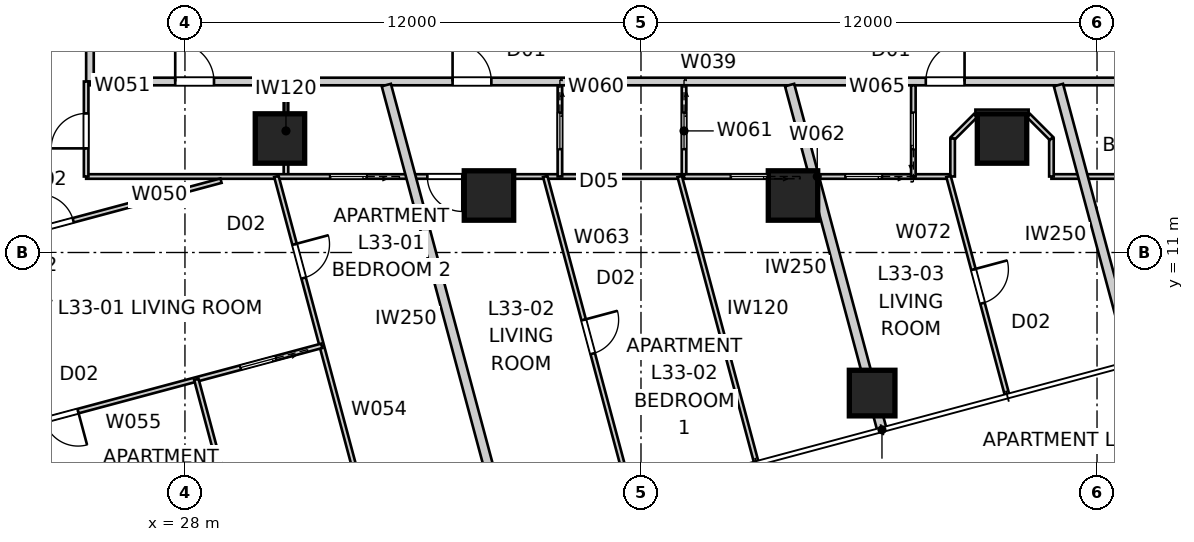
"""IFC4 building model, lengths in metres.
Left out: names, types, materials, properties, quantities, classifications, styles, units other than length and angle.
Written with IfcOpenShell. Run it as: python <this file> out.ifc"""

import sys

from ifc_helpers import new_model, si_unit, direction, frame, frame_2d, origin, origin_2d, place, context, subcontext, project, spatial, rectangle, extrude, element, fill, save


model = new_model("IFC4")
c1 = context("Model", 3, precision=1e-05, world=origin(), true_north=direction((0.0, 1.0)))
c2 = subcontext(c1, "Body", "Model", "MODEL_VIEW")
j1 = project(units=[si_unit("LENGTHUNIT", "METRE"), si_unit("PLANEANGLEUNIT", "RADIAN")], contexts=[c1])
p1 = place(None, origin())
s1 = spatial("IfcSite", under=j1, at=p1, CompositionType="ELEMENT")
p2 = place(p1, origin())
s2 = spatial("IfcBuilding", under=s1, at=p2, CompositionType="ELEMENT")
p3 = place(p2, frame((0.0, 0.0, 121.8)))
s3 = spatial("IfcBuildingStorey", under=s2, at=p3, CompositionType="ELEMENT", Elevation=121.8)
p4 = place(p3, frame((46.082, 7.301, 0.0), z_axis=(0.0, 0.0, 1.0), x_axis=(1.0, 0.0, 0.0)))
e1 = element("IfcColumn", 1, at=p4, inside=s3, PredefinedType="COLUMN", context=c2, shape_type="SweptSolid", body=[
    extrude(rectangle(XDim=1.2, YDim=1.2, at=origin_2d()), origin(), (0.0, 0.0, 1.0), 3.4),
])
for number, where, z_axis, x_axis in (
    (2, (30.5, 14.0, 0.0), (0.0, 0.0, 1.0), (1.0, 0.0, 0.0)),
    (3, (36.0, 12.5, 0.0), (0.0, 0.0, 1.0), (1.0, 0.0, 0.0)),
    (4, (44.0, 12.5, 0.0), (0.0, 0.0, 1.0), (1.0, 0.0, 0.0)),
    (5, (49.5, 14.0, 0.0), (0.0, 0.0, 1.0), (1.0, 0.0, 0.0)),
):
    element("IfcColumn", number, at=place(p3, frame(where, z_axis=z_axis, x_axis=x_axis)), inside=s3, PredefinedType="COLUMN", context=c2, shape_type="SweptSolid", body=[
        extrude(rectangle(XDim=1.3, YDim=1.3, at=origin_2d()), origin(), (0.0, 0.0, 1.0), 3.4),
    ])
p5 = place(p3, frame((25.5, 15.5, 0.0), z_axis=(0.0, 0.0, 1.0), x_axis=(1.0, 0.0, 0.0)))
e6 = element("IfcWall", 6, at=p5, inside=s3, PredefinedType="PARTITIONING", context=c2, shape_type="SweptSolid", body=[
    extrude(rectangle(XDim=28.2, YDim=0.2, at=frame_2d((14.1, 0.0))), origin(), (0.0, 0.0, 1.0), 3.25),
])
p6 = place(p5, frame((2.244, 0.0, 0.0)))
e7 = element("IfcOpeningElement", 7, at=p6, cuts=e6, PredefinedType="OPENING", context=c2, shape_type="SweptSolid", body=[
    extrude(rectangle(XDim=1.02, YDim=2.1, at=frame_2d((0.51, 1.05))), frame((0.0, 0.11, 0.0), z_axis=(0.0, -1.0, 0.0), x_axis=(1.0, 0.0, 0.0)), (0.0, 0.0, 1.0), 0.22),
])
p7 = place(p5, frame((9.542, 0.0, 0.0)))
e8 = element("IfcOpeningElement", 8, at=p7, cuts=e6, PredefinedType="OPENING", context=c2, shape_type="SweptSolid", body=[
    extrude(rectangle(XDim=1.02, YDim=2.34, at=frame_2d((0.51, 1.17))), frame((0.0, 0.11, 0.0), z_axis=(0.0, -1.0, 0.0), x_axis=(1.0, 0.0, 0.0)), (0.0, 0.0, 1.0), 0.22),
])
p8 = place(p5, frame((21.994, 0.0, 0.0)))
e9 = element("IfcOpeningElement", 9, at=p8, cuts=e6, PredefinedType="OPENING", context=c2, shape_type="SweptSolid", body=[
    extrude(rectangle(XDim=1.02, YDim=2.34, at=frame_2d((0.51, 1.17))), frame((0.0, 0.11, 0.0), z_axis=(0.0, -1.0, 0.0), x_axis=(1.0, 0.0, 0.0)), (0.0, 0.0, 1.0), 0.22),
])
p9 = place(p3, frame((25.5, 43.7, 0.0), z_axis=(0.0, 0.0, 1.0), x_axis=(0.0, -1.0, 0.0)))
e10 = element("IfcWall", 10, at=p9, inside=s3, PredefinedType="PARTITIONING", context=c2, shape_type="SweptSolid", body=[
    extrude(rectangle(XDim=28.2, YDim=0.2, at=frame_2d((14.1, 0.0))), origin(), (0.0, 0.0, 1.0), 3.25),
])
p10 = place(p9, frame((8.742, 0.0, 0.0)))
e11 = element("IfcOpeningElement", 11, at=p10, cuts=e10, PredefinedType="OPENING", context=c2, shape_type="SweptSolid", body=[
    extrude(rectangle(XDim=1.02, YDim=2.34, at=frame_2d((0.51, 1.17))), frame((0.0, 0.11, 0.0), z_axis=(0.0, -1.0, 0.0), x_axis=(1.0, 0.0, 0.0)), (0.0, 0.0, 1.0), 0.22),
])
p11 = place(p9, frame((1.808, 0.0, 0.0)))
e12 = element("IfcOpeningElement", 12, at=p11, cuts=e10, PredefinedType="OPENING", context=c2, shape_type="SweptSolid", body=[
    extrude(rectangle(XDim=1.02, YDim=2.1, at=frame_2d((0.51, 1.05))), frame((0.0, 0.11, 0.0), z_axis=(0.0, -1.0, 0.0), x_axis=(1.0, 0.0, 0.0)), (0.0, 0.0, 1.0), 0.22),
])
p12 = place(p3, frame((36.44, 3.682, 0.0), z_axis=(0.0, 0.0, 1.0), x_axis=(-0.258824223352, 0.965924438766, 0.0)))
e13 = element("IfcWall", 13, at=p12, inside=s3, PredefinedType="PARTITIONING", context=c2, shape_type="SweptSolid", body=[
    extrude(rectangle(XDim=12.138, YDim=0.25, at=frame_2d((6.069, 0.0))), origin(), (0.0, 0.0, 1.0), 3.25),
])
p13 = place(p3, frame((46.341, 6.335, 0.0), z_axis=(0.0, 0.0, 1.0), x_axis=(-0.258814481793, 0.965927049013, 0.0)))
e14 = element("IfcWall", 14, at=p13, inside=s3, PredefinedType="PARTITIONING", context=c2, shape_type="SweptSolid", body=[
    extrude(rectangle(XDim=9.392, YDim=0.25, at=frame_2d((4.696, 0.0))), origin(), (0.0, 0.0, 1.0), 3.25),
])
p14 = place(p3, frame((52.942, 8.104, 0.0), z_axis=(0.0, 0.0, 1.0), x_axis=(-0.258822171171, 0.965924988656, 0.0)))
e15 = element("IfcWall", 15, at=p14, inside=s3, PredefinedType="PARTITIONING", context=c2, shape_type="SweptSolid", body=[
    extrude(rectangle(XDim=7.56, YDim=0.25, at=frame_2d((3.78, 0.0))), origin(), (0.0, 0.0, 1.0), 3.25),
])
p15 = place(p3, frame((30.658, 15.4, 0.0), z_axis=(0.0, 0.0, 1.0), x_axis=(0.0, -1.0, 0.0)))
e16 = element("IfcWall", 16, at=p15, inside=s3, PredefinedType="PARTITIONING", context=c2, shape_type="SweptSolid", body=[
    extrude(rectangle(XDim=2.4, YDim=0.12, at=frame_2d((1.2, 0.0))), origin(), (0.0, 0.0, 1.0), 3.25),
])
p16 = place(p3, frame((41.07, 13.0, 0.0), z_axis=(0.0, 0.0, 1.0), x_axis=(-1.0, 0.0, 0.0)))
e17 = element("IfcWall", 17, at=p16, inside=s3, PredefinedType="PARTITIONING", context=c2, shape_type="SweptSolid", body=[
    extrude(rectangle(XDim=15.67, YDim=0.12, at=frame_2d((7.835, 0.0))), origin(), (0.0, 0.0, 1.0), 2.55),
])
p17 = place(p16, frame((5.772, 0.0, 0.0)))
e18 = element("IfcOpeningElement", 18, at=p17, cuts=e17, PredefinedType="OPENING", context=c2, shape_type="SweptSolid", body=[
    extrude(rectangle(XDim=0.92, YDim=2.34, at=frame_2d((0.46, 1.17))), frame((0.0, 0.07, 0.0), z_axis=(0.0, -1.0, 0.0), x_axis=(1.0, 0.0, 0.0)), (0.0, 0.0, 1.0), 0.14),
])
p18 = place(p16, frame((8.289, 0.0, 0.0)))
e19 = element("IfcOpeningElement", 19, at=p18, cuts=e17, PredefinedType="OPENING", context=c2, shape_type="SweptSolid", body=[
    extrude(rectangle(XDim=0.96, YDim=2.1, at=frame_2d((0.48, 1.05))), frame((0.0, 0.07, 0.0), z_axis=(0.0, -1.0, 0.0), x_axis=(1.0, 0.0, 0.0)), (0.0, 0.0, 1.0), 0.14),
])
p19 = place(p3, frame((25.4, 13.0, 0.0), z_axis=(0.0, 0.0, 1.0), x_axis=(0.0, 1.0, 0.0)))
e20 = element("IfcWall", 20, at=p19, inside=s3, PredefinedType="PARTITIONING", context=c2, shape_type="SweptSolid", body=[
    extrude(rectangle(XDim=2.5, YDim=0.12, at=frame_2d((1.25, 0.0))), origin(), (0.0, 0.0, 1.0), 3.25),
])
p20 = place(p19, frame((0.74, 0.0, 0.0)))
e21 = element("IfcOpeningElement", 21, at=p20, cuts=e20, PredefinedType="OPENING", context=c2, shape_type="SweptSolid", body=[
    extrude(rectangle(XDim=0.92, YDim=2.34, at=frame_2d((0.46, 1.17))), frame((0.0, 0.07, 0.0), z_axis=(0.0, -1.0, 0.0), x_axis=(1.0, 0.0, 0.0)), (0.0, 0.0, 1.0), 0.14),
])
p21 = place(p3, frame((30.406, 13.0, 0.0), z_axis=(0.0, 0.0, 1.0), x_axis=(0.258819200315, -0.9659257847, 0.0)))
e22 = element("IfcWall", 22, at=p21, inside=s3, PredefinedType="PARTITIONING", context=c2, shape_type="SweptSolid", body=[
    extrude(rectangle(XDim=10.522, YDim=0.12, at=frame_2d((5.261, 0.0))), origin(), (0.0, 0.0, 1.0), 2.722),
])
p22 = place(p21, frame((1.846, 0.0, 0.0)))
e23 = element("IfcOpeningElement", 23, at=p22, cuts=e22, PredefinedType="OPENING", context=c2, shape_type="SweptSolid", body=[
    extrude(rectangle(XDim=0.92, YDim=2.34, at=frame_2d((0.46, 1.17))), frame((0.0, 0.07, 0.0), z_axis=(0.0, -1.0, 0.0), x_axis=(1.0, 0.0, 0.0)), (0.0, 0.0, 1.0), 0.14),
])
p23 = place(p3, frame((31.6, 8.544, 0.0), z_axis=(0.0, 0.0, 1.0), x_axis=(-0.965927151587, -0.258814098973, 0.0)))
e24 = element("IfcWall", 24, at=p23, inside=s3, PredefinedType="PARTITIONING", context=c2, shape_type="SweptSolid", body=[
    extrude(rectangle(XDim=10.793, YDim=0.12, at=frame_2d((5.396, 0.0))), origin(), (0.0, 0.0, 1.0), 3.25),
])
p24 = place(p23, frame((6.64, 0.0, 0.0)))
e25 = element("IfcOpeningElement", 25, at=p24, cuts=e24, PredefinedType="OPENING", context=c2, shape_type="SweptSolid", body=[
    extrude(rectangle(XDim=0.92, YDim=2.34, at=frame_2d((0.46, 1.17))), frame((0.0, 0.07, 0.0), z_axis=(0.0, -1.0, 0.0), x_axis=(1.0, 0.0, 0.0)), (0.0, 0.0, 1.0), 0.14),
])
p25 = place(p23, frame((1.253, 0.0, 0.0)))
e26 = element("IfcOpeningElement", 26, at=p25, cuts=e24, PredefinedType="OPENING", context=c2, shape_type="SweptSolid", body=[
    extrude(rectangle(XDim=0.96, YDim=2.1, at=frame_2d((0.48, 1.05))), frame((0.0, 0.07, 0.0), z_axis=(0.0, -1.0, 0.0), x_axis=(1.0, 0.0, 0.0)), (0.0, 0.0, 1.0), 0.14),
])
p26 = place(p3, frame((19.911, 10.468, 0.0), z_axis=(0.0, 0.0, 1.0), x_axis=(0.965927203676, 0.25881390457, 0.0)))
e27 = element("IfcWall", 27, at=p26, inside=s3, PredefinedType="PARTITIONING", context=c2, shape_type="SweptSolid", body=[
    extrude(rectangle(XDim=9.357, YDim=0.12, at=frame_2d((4.678, 0.0))), origin(), (0.0, 0.0, 1.0), 2.638),
])
p27 = place(p26, frame((4.411, 0.0, 0.0)))
e28 = element("IfcOpeningElement", 28, at=p27, cuts=e27, PredefinedType="OPENING", context=c2, shape_type="SweptSolid", body=[
    extrude(rectangle(XDim=0.92, YDim=2.34, at=frame_2d((0.46, 1.17))), frame((0.0, 0.07, 0.0), z_axis=(0.0, -1.0, 0.0), x_axis=(1.0, 0.0, 0.0)), (0.0, 0.0, 1.0), 0.14),
])
p28 = place(p3, frame((28.3, 7.66, 0.0), z_axis=(0.0, 0.0, 1.0), x_axis=(0.25882212607, -0.965925000741, 0.0)))
e29 = element("IfcWall", 29, at=p28, inside=s3, PredefinedType="PARTITIONING", context=c2, shape_type="SweptSolid", body=[
    extrude(rectangle(XDim=5.91, YDim=0.12, at=frame_2d((2.955, 0.0))), origin(), (0.0, 0.0, 1.0), 3.25),
])
p29 = place(p3, frame((37.866, 15.4, 0.0), z_axis=(0.0, 0.0, 1.0), x_axis=(0.0, -1.0, 0.0)))
e30 = element("IfcWall", 30, at=p29, inside=s3, PredefinedType="PARTITIONING", context=c2, shape_type="SweptSolid", body=[
    extrude(rectangle(XDim=2.4, YDim=0.12, at=frame_2d((1.2, 0.0))), origin(), (0.0, 0.0, 1.0), 3.25),
])
p30 = place(p29, frame((0.72, 0.0, 0.0)))
e31 = element("IfcOpeningElement", 31, at=p30, cuts=e30, PredefinedType="OPENING", context=c2, shape_type="SweptSolid", body=[
    extrude(rectangle(XDim=0.96, YDim=2.1, at=frame_2d((0.48, 1.05))), frame((0.0, 0.07, 0.0), z_axis=(0.0, -1.0, 0.0), x_axis=(1.0, 0.0, 0.0)), (0.0, 0.0, 1.0), 0.14),
])
p31 = place(p3, frame((41.132, 15.4, 0.0), z_axis=(0.0, 0.0, 1.0), x_axis=(0.0, -1.0, 0.0)))
e32 = element("IfcWall", 32, at=p31, inside=s3, PredefinedType="PARTITIONING", context=c2, shape_type="SweptSolid", body=[
    extrude(rectangle(XDim=2.4, YDim=0.12, at=frame_2d((1.2, 0.0))), origin(), (0.0, 0.0, 1.0), 3.25),
])
p32 = place(p31, frame((0.72, 0.0, 0.0)))
e33 = element("IfcOpeningElement", 33, at=p32, cuts=e32, PredefinedType="OPENING", context=c2, shape_type="SweptSolid", body=[
    extrude(rectangle(XDim=0.96, YDim=2.1, at=frame_2d((0.48, 1.05))), frame((0.0, 0.07, 0.0), z_axis=(0.0, -1.0, 0.0), x_axis=(1.0, 0.0, 0.0)), (0.0, 0.0, 1.0), 0.14),
])
p33 = place(p3, frame((48.144, 13.0, 0.0), z_axis=(0.0, 0.0, 1.0), x_axis=(-1.0, 0.0, 0.0)))
e34 = element("IfcWall", 34, at=p33, inside=s3, PredefinedType="PARTITIONING", context=c2, shape_type="SweptSolid", body=[
    extrude(rectangle(XDim=7.012, YDim=0.12, at=frame_2d((3.506, 0.0))), origin(), (0.0, 0.0, 1.0), 2.55),
])
p34 = place(p33, frame((1.803, 0.0, 0.0)))
e35 = element("IfcOpeningElement", 35, at=p34, cuts=e34, PredefinedType="OPENING", context=c2, shape_type="SweptSolid", body=[
    extrude(rectangle(XDim=0.96, YDim=2.1, at=frame_2d((0.48, 1.05))), frame((0.0, 0.07, 0.0), z_axis=(0.0, -1.0, 0.0), x_axis=(1.0, 0.0, 0.0)), (0.0, 0.0, 1.0), 0.14),
])
p35 = place(p33, frame((4.82, 0.0, 0.0)))
e36 = element("IfcOpeningElement", 36, at=p35, cuts=e34, PredefinedType="OPENING", context=c2, shape_type="SweptSolid", body=[
    extrude(rectangle(XDim=0.96, YDim=2.1, at=frame_2d((0.48, 1.05))), frame((0.0, 0.07, 0.0), z_axis=(0.0, -1.0, 0.0), x_axis=(1.0, 0.0, 0.0)), (0.0, 0.0, 1.0), 0.14),
])
p36 = place(p3, frame((37.481, 13.0, 0.0), z_axis=(0.0, 0.0, 1.0), x_axis=(0.258819860698, -0.965925607751, 0.0)))
e37 = element("IfcWall", 37, at=p36, inside=s3, PredefinedType="PARTITIONING", context=c2, shape_type="SweptSolid", body=[
    extrude(rectangle(XDim=8.691, YDim=0.12, at=frame_2d((4.346, 0.0))), origin(), (0.0, 0.0, 1.0), 3.25),
])
p37 = place(p36, frame((3.906, 0.0, 0.0)))
e38 = element("IfcOpeningElement", 38, at=p37, cuts=e37, PredefinedType="OPENING", context=c2, shape_type="SweptSolid", body=[
    extrude(rectangle(XDim=0.92, YDim=2.34, at=frame_2d((0.46, 1.17))), frame((0.0, 0.07, 0.0), z_axis=(0.0, -1.0, 0.0), x_axis=(1.0, 0.0, 0.0)), (0.0, 0.0, 1.0), 0.14),
])
p38 = place(p3, frame((41.018, 13.0, 0.0), z_axis=(0.0, 0.0, 1.0), x_axis=(0.258813509689, -0.965927309482, 0.0)))
e39 = element("IfcWall", 39, at=p38, inside=s3, PredefinedType="PARTITIONING", context=c2, shape_type="SweptSolid", body=[
    extrude(rectangle(XDim=7.776, YDim=0.12, at=frame_2d((3.888, 0.0))), origin(), (0.0, 0.0, 1.0), 3.25),
])
p39 = place(p3, frame((47.167, 13.0, 0.0), z_axis=(0.0, 0.0, 1.0), x_axis=(0.0, 1.0, 0.0)))
e40 = element("IfcWall", 40, at=p39, inside=s3, PredefinedType="PARTITIONING", context=c2, shape_type="SweptSolid", body=[
    extrude(rectangle(XDim=2.4, YDim=0.12, at=frame_2d((1.2, 0.0))), origin(), (0.0, 0.0, 1.0), 3.25),
])
p40 = place(p39, frame((0.72, 0.0, 0.0)))
e41 = element("IfcOpeningElement", 41, at=p40, cuts=e40, PredefinedType="OPENING", context=c2, shape_type="SweptSolid", body=[
    extrude(rectangle(XDim=0.96, YDim=2.1, at=frame_2d((0.48, 1.05))), frame((0.0, 0.07, 0.0), z_axis=(0.0, -1.0, 0.0), x_axis=(1.0, 0.0, 0.0)), (0.0, 0.0, 1.0), 0.14),
])
p41 = place(p3, frame((56.2, 13.0, 0.0), z_axis=(0.0, 0.0, 1.0), x_axis=(-1.0, 0.0, 0.0)))
e42 = element("IfcWall", 42, at=p41, inside=s3, PredefinedType="PARTITIONING", context=c2, shape_type="SweptSolid", body=[
    extrude(rectangle(XDim=5.4, YDim=0.12, at=frame_2d((2.7, 0.0))), origin(), (0.0, 0.0, 1.0), 3.25),
])
p42 = place(p3, frame((50.8, 13.0, 0.0), z_axis=(0.0, 0.0, 1.0), x_axis=(0.0, 1.0, 0.0)))
e43 = element("IfcWall", 43, at=p42, inside=s3, PredefinedType="PARTITIONING", context=c2, shape_type="SweptSolid", body=[
    extrude(rectangle(XDim=1.0, YDim=0.12, at=frame_2d((0.5, 0.0))), origin(), (0.0, 0.0, 1.0), 3.25),
])
p43 = place(p3, frame((50.8, 14.0, 0.0), z_axis=(0.0, 0.0, 1.0), x_axis=(-0.707106781187, 0.707106781187, 0.0)))
e44 = element("IfcWall", 44, at=p43, inside=s3, PredefinedType="PARTITIONING", context=c2, shape_type="SweptSolid", body=[
    extrude(rectangle(XDim=0.849, YDim=0.12, at=frame_2d((0.424, 0.0))), origin(), (0.0, 0.0, 1.0), 3.25),
])
p44 = place(p3, frame((50.2, 14.7, 0.0), z_axis=(0.0, 0.0, 1.0), x_axis=(-1.0, 0.0, 0.0)))
e45 = element("IfcWall", 45, at=p44, inside=s3, PredefinedType="PARTITIONING", context=c2, shape_type="SweptSolid", body=[
    extrude(rectangle(XDim=1.4, YDim=0.12, at=frame_2d((0.7, 0.0))), origin(), (0.0, 0.0, 1.0), 3.25),
])
p45 = place(p3, frame((48.8, 14.6, 0.0), z_axis=(0.0, 0.0, 1.0), x_axis=(-0.707106781187, -0.707106781187, 0.0)))
e46 = element("IfcWall", 46, at=p45, inside=s3, PredefinedType="PARTITIONING", context=c2, shape_type="SweptSolid", body=[
    extrude(rectangle(XDim=0.849, YDim=0.12, at=frame_2d((0.424, 0.0))), origin(), (0.0, 0.0, 1.0), 3.25),
])
p46 = place(p3, frame((48.2, 14.0, 0.0), z_axis=(0.0, 0.0, 1.0), x_axis=(0.0, -1.0, 0.0)))
e47 = element("IfcWall", 47, at=p46, inside=s3, PredefinedType="PARTITIONING", context=c2, shape_type="SweptSolid", body=[
    extrude(rectangle(XDim=1.0, YDim=0.12, at=frame_2d((0.5, 0.0))), origin(), (0.0, 0.0, 1.0), 3.25),
])
p47 = place(p3, frame((48.092, 13.0, 0.0), z_axis=(0.0, 0.0, 1.0), x_axis=(0.258812722515, -0.965927520399, 0.0)))
e48 = element("IfcWall", 48, at=p47, inside=s3, PredefinedType="PARTITIONING", context=c2, shape_type="SweptSolid", body=[
    extrude(rectangle(XDim=5.945, YDim=0.12, at=frame_2d((2.972, 0.0))), origin(), (0.0, 0.0, 1.0), 3.25),
])
p48 = place(p47, frame((2.532, 0.0, 0.0)))
e49 = element("IfcOpeningElement", 49, at=p48, cuts=e48, PredefinedType="OPENING", context=c2, shape_type="SweptSolid", body=[
    extrude(rectangle(XDim=0.92, YDim=2.34, at=frame_2d((0.46, 1.17))), frame((0.0, 0.07, 0.0), z_axis=(0.0, -1.0, 0.0), x_axis=(1.0, 0.0, 0.0)), (0.0, 0.0, 1.0), 0.14),
])
p49 = place(p6, origin())
e50 = element("IfcDoor", 50, at=p49, inside=s3, OperationType="SINGLE_SWING_LEFT", PredefinedType="DOOR", context=c2, shape_type="SweptSolid", body=[
    extrude(rectangle(XDim=1.02, YDim=2.1, at=frame_2d((0.51, 1.05))), frame((0.0, 0.025, 0.0), z_axis=(0.0, -1.0, 0.0), x_axis=(1.0, 0.0, 0.0)), (0.0, 0.0, 1.0), 0.05),
])
fill(e7, e50)
p50 = place(p7, origin())
e51 = element("IfcDoor", 51, at=p50, inside=s3, OperationType="SINGLE_SWING_LEFT", PredefinedType="DOOR", context=c2, shape_type="SweptSolid", body=[
    extrude(rectangle(XDim=1.02, YDim=2.34, at=frame_2d((0.51, 1.17))), frame((0.0, 0.025, 0.0), z_axis=(0.0, -1.0, 0.0), x_axis=(1.0, 0.0, 0.0)), (0.0, 0.0, 1.0), 0.05),
])
fill(e8, e51)
p51 = place(p8, origin())
e52 = element("IfcDoor", 52, at=p51, inside=s3, OperationType="SINGLE_SWING_RIGHT", PredefinedType="DOOR", context=c2, shape_type="SweptSolid", body=[
    extrude(rectangle(XDim=1.02, YDim=2.34, at=frame_2d((0.51, 1.17))), frame((0.0, 0.025, 0.0), z_axis=(0.0, -1.0, 0.0), x_axis=(1.0, 0.0, 0.0)), (0.0, 0.0, 1.0), 0.05),
])
fill(e9, e52)
p52 = place(p20, origin())
e53 = element("IfcDoor", 53, at=p52, inside=s3, OperationType="SINGLE_SWING_LEFT", PredefinedType="DOOR", context=c2, shape_type="SweptSolid", body=[
    extrude(rectangle(XDim=0.92, YDim=2.34, at=frame_2d((0.46, 1.17))), frame((0.0, 0.025, 0.0), z_axis=(0.0, -1.0, 0.0), x_axis=(1.0, 0.0, 0.0)), (0.0, 0.0, 1.0), 0.05),
])
fill(e21, e53)
p53 = place(p17, origin())
e54 = element("IfcDoor", 54, at=p53, inside=s3, OperationType="SINGLE_SWING_LEFT", PredefinedType="DOOR", context=c2, shape_type="SweptSolid", body=[
    extrude(rectangle(XDim=0.92, YDim=2.34, at=frame_2d((0.46, 1.17))), frame((0.0, 0.025, 0.0), z_axis=(0.0, -1.0, 0.0), x_axis=(1.0, 0.0, 0.0)), (0.0, 0.0, 1.0), 0.05),
])
fill(e18, e54)
p54 = place(p30, origin())
e55 = element("IfcDoor", 55, at=p54, inside=s3, OperationType="SLIDING_TO_LEFT", PredefinedType="DOOR", context=c2, shape_type="SweptSolid", body=[
    extrude(rectangle(XDim=0.96, YDim=2.1, at=frame_2d((0.48, 1.05))), frame((0.0, 0.025, 0.0), z_axis=(0.0, -1.0, 0.0), x_axis=(1.0, 0.0, 0.0)), (0.0, 0.0, 1.0), 0.05),
])
fill(e31, e55)
p55 = place(p40, origin())
e56 = element("IfcDoor", 56, at=p55, inside=s3, OperationType="SLIDING_TO_LEFT", PredefinedType="DOOR", context=c2, shape_type="SweptSolid", body=[
    extrude(rectangle(XDim=0.96, YDim=2.1, at=frame_2d((0.48, 1.05))), frame((0.0, 0.025, 0.0), z_axis=(0.0, -1.0, 0.0), x_axis=(1.0, 0.0, 0.0)), (0.0, 0.0, 1.0), 0.05),
])
fill(e41, e56)
p56 = place(p27, origin())
e57 = element("IfcDoor", 57, at=p56, inside=s3, OperationType="SINGLE_SWING_LEFT", PredefinedType="DOOR", context=c2, shape_type="SweptSolid", body=[
    extrude(rectangle(XDim=0.92, YDim=2.34, at=frame_2d((0.46, 1.17))), frame((0.0, 0.025, 0.0), z_axis=(0.0, -1.0, 0.0), x_axis=(1.0, 0.0, 0.0)), (0.0, 0.0, 1.0), 0.05),
])
fill(e28, e57)
p57 = place(p37, origin())
e58 = element("IfcDoor", 58, at=p57, inside=s3, OperationType="SINGLE_SWING_LEFT", PredefinedType="DOOR", context=c2, shape_type="SweptSolid", body=[
    extrude(rectangle(XDim=0.92, YDim=2.34, at=frame_2d((0.46, 1.17))), frame((0.0, 0.025, 0.0), z_axis=(0.0, -1.0, 0.0), x_axis=(1.0, 0.0, 0.0)), (0.0, 0.0, 1.0), 0.05),
])
fill(e38, e58)
p58 = place(p32, origin())
e59 = element("IfcDoor", 59, at=p58, inside=s3, OperationType="SLIDING_TO_LEFT", PredefinedType="DOOR", context=c2, shape_type="SweptSolid", body=[
    extrude(rectangle(XDim=0.96, YDim=2.1, at=frame_2d((0.48, 1.05))), frame((0.0, 0.025, 0.0), z_axis=(0.0, -1.0, 0.0), x_axis=(1.0, 0.0, 0.0)), (0.0, 0.0, 1.0), 0.05),
])
fill(e33, e59)
p59 = place(p34, origin())
e60 = element("IfcDoor", 60, at=p59, inside=s3, OperationType="SLIDING_TO_LEFT", PredefinedType="DOOR", context=c2, shape_type="SweptSolid", body=[
    extrude(rectangle(XDim=0.96, YDim=2.1, at=frame_2d((0.48, 1.05))), frame((0.0, 0.025, 0.0), z_axis=(0.0, -1.0, 0.0), x_axis=(1.0, 0.0, 0.0)), (0.0, 0.0, 1.0), 0.05),
])
fill(e35, e60)
p60 = place(p24, origin())
e61 = element("IfcDoor", 61, at=p60, inside=s3, OperationType="SINGLE_SWING_LEFT", PredefinedType="DOOR", context=c2, shape_type="SweptSolid", body=[
    extrude(rectangle(XDim=0.92, YDim=2.34, at=frame_2d((0.46, 1.17))), frame((0.0, 0.025, 0.0), z_axis=(0.0, -1.0, 0.0), x_axis=(1.0, 0.0, 0.0)), (0.0, 0.0, 1.0), 0.05),
])
fill(e25, e61)
p61 = place(p22, origin())
e62 = element("IfcDoor", 62, at=p61, inside=s3, OperationType="SINGLE_SWING_LEFT", PredefinedType="DOOR", context=c2, shape_type="SweptSolid", body=[
    extrude(rectangle(XDim=0.92, YDim=2.34, at=frame_2d((0.46, 1.17))), frame((0.0, 0.025, 0.0), z_axis=(0.0, -1.0, 0.0), x_axis=(1.0, 0.0, 0.0)), (0.0, 0.0, 1.0), 0.05),
])
fill(e23, e62)
p62 = place(p25, origin())
e63 = element("IfcDoor", 63, at=p62, inside=s3, OperationType="SLIDING_TO_LEFT", PredefinedType="DOOR", context=c2, shape_type="SweptSolid", body=[
    extrude(rectangle(XDim=0.96, YDim=2.1, at=frame_2d((0.48, 1.05))), frame((0.0, 0.025, 0.0), z_axis=(0.0, -1.0, 0.0), x_axis=(1.0, 0.0, 0.0)), (0.0, 0.0, 1.0), 0.05),
])
fill(e26, e63)
p63 = place(p35, origin())
e64 = element("IfcDoor", 64, at=p63, inside=s3, OperationType="SLIDING_TO_LEFT", PredefinedType="DOOR", context=c2, shape_type="SweptSolid", body=[
    extrude(rectangle(XDim=0.96, YDim=2.1, at=frame_2d((0.48, 1.05))), frame((0.0, 0.025, 0.0), z_axis=(0.0, -1.0, 0.0), x_axis=(1.0, 0.0, 0.0)), (0.0, 0.0, 1.0), 0.05),
])
fill(e36, e64)
p64 = place(p48, origin())
e65 = element("IfcDoor", 65, at=p64, inside=s3, OperationType="SINGLE_SWING_LEFT", PredefinedType="DOOR", context=c2, shape_type="SweptSolid", body=[
    extrude(rectangle(XDim=0.92, YDim=2.34, at=frame_2d((0.46, 1.17))), frame((0.0, 0.025, 0.0), z_axis=(0.0, -1.0, 0.0), x_axis=(1.0, 0.0, 0.0)), (0.0, 0.0, 1.0), 0.05),
])
fill(e49, e65)
p65 = place(p18, origin())
e66 = element("IfcDoor", 66, at=p65, inside=s3, OperationType="SLIDING_TO_LEFT", PredefinedType="DOOR", context=c2, shape_type="SweptSolid", body=[
    extrude(rectangle(XDim=0.96, YDim=2.1, at=frame_2d((0.48, 1.05))), frame((0.0, 0.025, 0.0), z_axis=(0.0, -1.0, 0.0), x_axis=(1.0, 0.0, 0.0)), (0.0, 0.0, 1.0), 0.05),
])
fill(e19, e66)
save(model, sys.argv[1])
